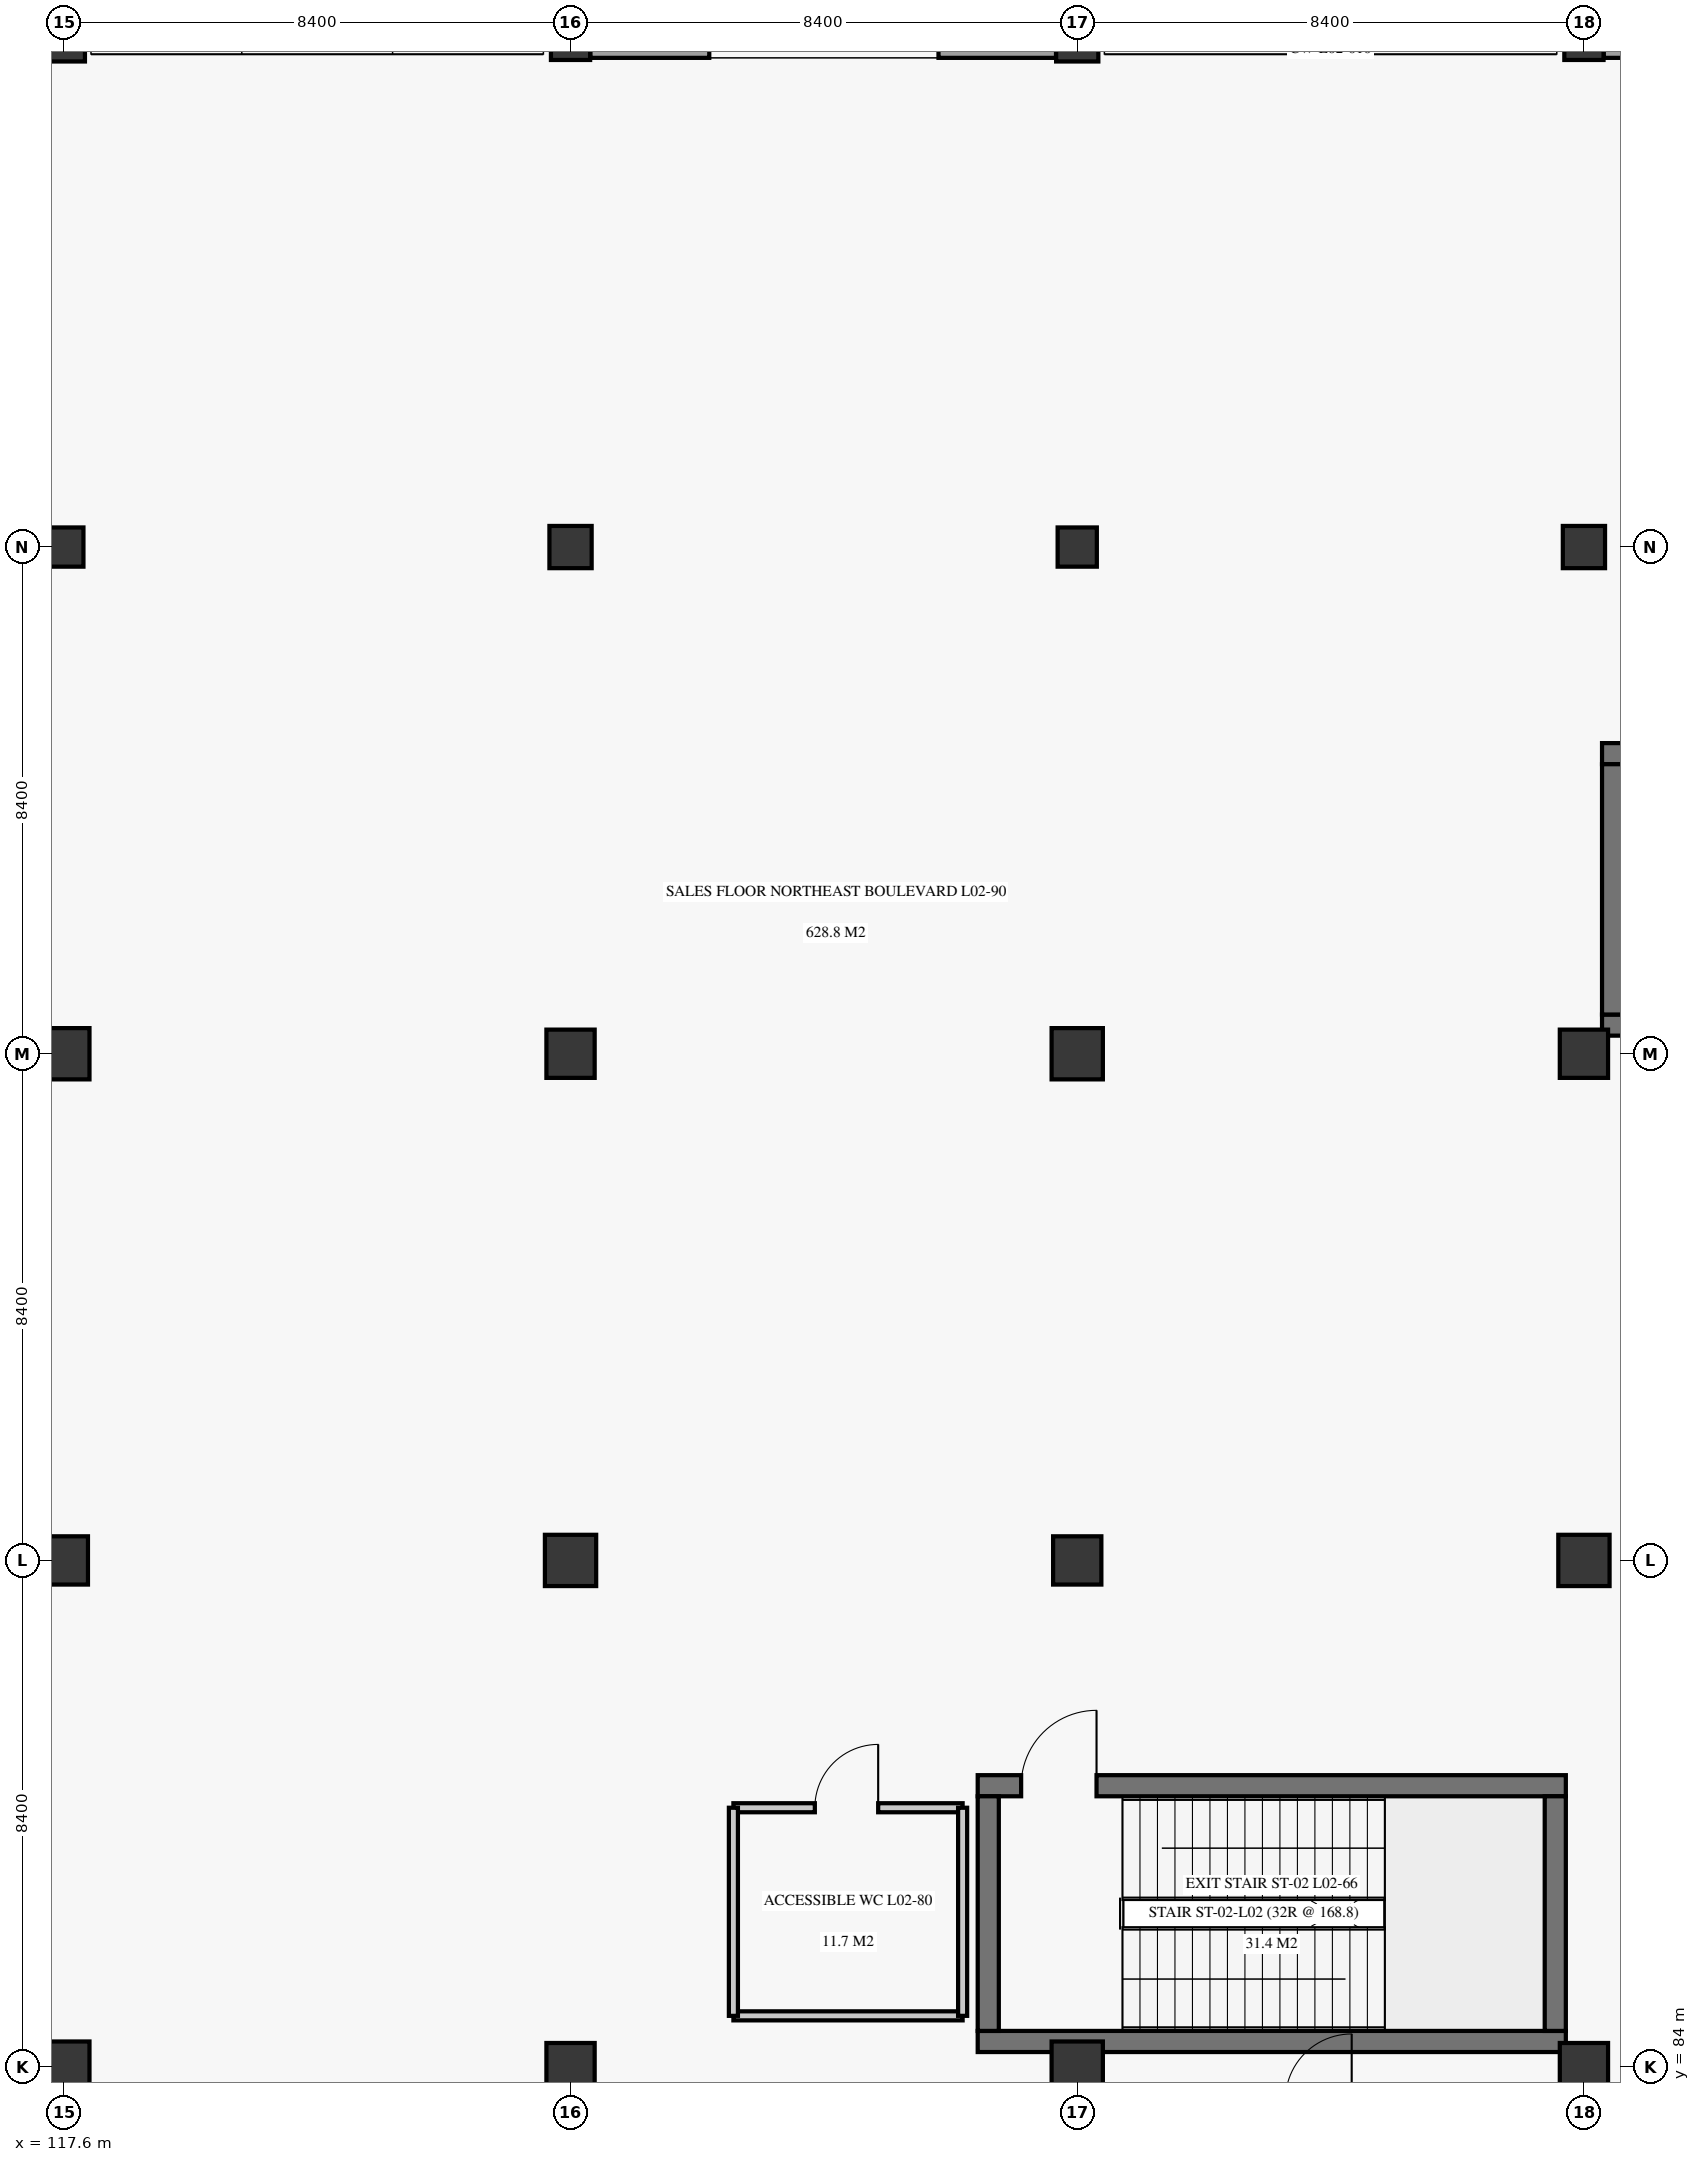
"""IFC4 building model, lengths in metres.
Left out: names, types, materials, properties, quantities, classifications, styles, units other than length and angle.
Written with IfcOpenShell. Run it as: python <this file> out.ifc"""

import sys

from ifc_helpers import new_model, si_unit, direction, frame, frame_2d, origin, origin_2d, place, context, subcontext, project, spatial, rectangle, extrude, element, fill, save


model = new_model("IFC4")
c1 = context("Model", 3, precision=1e-05, world=origin(), true_north=direction((0.0, 1.0)))
c2 = subcontext(c1, "Body", "Model", "MODEL_VIEW")
j1 = project(units=[si_unit("LENGTHUNIT", "METRE"), si_unit("PLANEANGLEUNIT", "RADIAN")], contexts=[c1])
p1 = place(None, origin())
s1 = spatial("IfcSite", under=j1, at=p1, CompositionType="ELEMENT")
p2 = place(p1, origin())
s2 = spatial("IfcBuilding", under=s1, at=p2, CompositionType="ELEMENT")
p3 = place(p2, frame((0.0, 0.0, 6.0)))
s3 = spatial("IfcBuildingStorey", under=s2, at=p3, CompositionType="ELEMENT", Elevation=6.0)
p4 = place(p3, frame((117.6, 84.0, 0.0), z_axis=(0.0, 0.0, 1.0), x_axis=(1.0, 0.0, 0.0)))
e1 = element("IfcColumn", 1, at=p4, inside=s3, PredefinedType="COLUMN", context=c2, shape_type="SweptSolid", body=[
    extrude(rectangle(XDim=0.85, YDim=0.85, at=origin_2d()), origin(), (0.0, 0.0, 1.0), 5.1),
])
p5 = place(p3, frame((117.6, 92.4, 0.0), z_axis=(0.0, 0.0, 1.0), x_axis=(1.0, 0.0, 0.0)))
e2 = element("IfcColumn", 2, at=p5, inside=s3, PredefinedType="COLUMN", context=c2, shape_type="SweptSolid", body=[
    extrude(rectangle(XDim=0.8, YDim=0.8, at=origin_2d()), origin(), (0.0, 0.0, 1.0), 5.1),
])
p6 = place(p3, frame((117.6, 100.8, 0.0), z_axis=(0.0, 0.0, 1.0), x_axis=(1.0, 0.0, 0.0)))
e3 = element("IfcColumn", 3, at=p6, inside=s3, PredefinedType="COLUMN", context=c2, shape_type="SweptSolid", body=[
    extrude(rectangle(XDim=0.85, YDim=0.85, at=origin_2d()), origin(), (0.0, 0.0, 1.0), 5.1),
])
p7 = place(p3, frame((117.6, 109.2, 0.0), z_axis=(0.0, 0.0, 1.0), x_axis=(1.0, 0.0, 0.0)))
e4 = element("IfcColumn", 4, at=p7, inside=s3, PredefinedType="COLUMN", context=c2, shape_type="SweptSolid", body=[
    extrude(rectangle(XDim=0.65, YDim=0.65, at=origin_2d()), origin(), (0.0, 0.0, 1.0), 5.1),
])
p8 = place(p3, frame((117.6, 117.6, 0.0), z_axis=(0.0, 0.0, 1.0), x_axis=(1.0, 0.0, 0.0)))
e5 = element("IfcColumn", 5, at=p8, inside=s3, PredefinedType="COLUMN", context=c2, shape_type="SweptSolid", body=[
    extrude(rectangle(XDim=0.7, YDim=0.7, at=origin_2d()), origin(), (0.0, 0.0, 1.0), 5.1),
])
p9 = place(p3, frame((126.0, 84.0, 0.0), z_axis=(0.0, 0.0, 1.0), x_axis=(1.0, 0.0, 0.0)))
e6 = element("IfcColumn", 6, at=p9, inside=s3, PredefinedType="COLUMN", context=c2, shape_type="SweptSolid", body=[
    extrude(rectangle(XDim=0.8, YDim=0.8, at=origin_2d()), origin(), (0.0, 0.0, 1.0), 5.1),
])
p10 = place(p3, frame((126.0, 92.4, 0.0), z_axis=(0.0, 0.0, 1.0), x_axis=(1.0, 0.0, 0.0)))
e7 = element("IfcColumn", 7, at=p10, inside=s3, PredefinedType="COLUMN", context=c2, shape_type="SweptSolid", body=[
    extrude(rectangle(XDim=0.85, YDim=0.85, at=origin_2d()), origin(), (0.0, 0.0, 1.0), 5.1),
])
p11 = place(p3, frame((126.0, 100.8, 0.0), z_axis=(0.0, 0.0, 1.0), x_axis=(1.0, 0.0, 0.0)))
e8 = element("IfcColumn", 8, at=p11, inside=s3, PredefinedType="COLUMN", context=c2, shape_type="SweptSolid", body=[
    extrude(rectangle(XDim=0.8, YDim=0.8, at=origin_2d()), origin(), (0.0, 0.0, 1.0), 5.1),
])
p12 = place(p3, frame((126.0, 109.2, 0.0), z_axis=(0.0, 0.0, 1.0), x_axis=(1.0, 0.0, 0.0)))
e9 = element("IfcColumn", 9, at=p12, inside=s3, PredefinedType="COLUMN", context=c2, shape_type="SweptSolid", body=[
    extrude(rectangle(XDim=0.7, YDim=0.7, at=origin_2d()), origin(), (0.0, 0.0, 1.0), 5.1),
])
p13 = place(p3, frame((126.0, 117.6, 0.0), z_axis=(0.0, 0.0, 1.0), x_axis=(1.0, 0.0, 0.0)))
e10 = element("IfcColumn", 10, at=p13, inside=s3, PredefinedType="COLUMN", context=c2, shape_type="SweptSolid", body=[
    extrude(rectangle(XDim=0.65, YDim=0.65, at=origin_2d()), origin(), (0.0, 0.0, 1.0), 5.1),
])
p14 = place(p3, frame((134.4, 84.0, 0.0), z_axis=(0.0, 0.0, 1.0), x_axis=(1.0, 0.0, 0.0)))
e11 = element("IfcColumn", 11, at=p14, inside=s3, PredefinedType="COLUMN", context=c2, shape_type="SweptSolid", body=[
    extrude(rectangle(XDim=0.85, YDim=0.85, at=origin_2d()), origin(), (0.0, 0.0, 1.0), 5.1),
])
p15 = place(p3, frame((134.4, 92.4, 0.0), z_axis=(0.0, 0.0, 1.0), x_axis=(1.0, 0.0, 0.0)))
e12 = element("IfcColumn", 12, at=p15, inside=s3, PredefinedType="COLUMN", context=c2, shape_type="SweptSolid", body=[
    extrude(rectangle(XDim=0.8, YDim=0.8, at=origin_2d()), origin(), (0.0, 0.0, 1.0), 5.1),
])
p16 = place(p3, frame((134.4, 100.8, 0.0), z_axis=(0.0, 0.0, 1.0), x_axis=(1.0, 0.0, 0.0)))
e13 = element("IfcColumn", 13, at=p16, inside=s3, PredefinedType="COLUMN", context=c2, shape_type="SweptSolid", body=[
    extrude(rectangle(XDim=0.85, YDim=0.85, at=origin_2d()), origin(), (0.0, 0.0, 1.0), 5.1),
])
p17 = place(p3, frame((134.4, 109.2, 0.0), z_axis=(0.0, 0.0, 1.0), x_axis=(1.0, 0.0, 0.0)))
e14 = element("IfcColumn", 14, at=p17, inside=s3, PredefinedType="COLUMN", context=c2, shape_type="SweptSolid", body=[
    extrude(rectangle(XDim=0.65, YDim=0.65, at=origin_2d()), origin(), (0.0, 0.0, 1.0), 5.1),
])
p18 = place(p3, frame((134.4, 117.6, 0.0), z_axis=(0.0, 0.0, 1.0), x_axis=(1.0, 0.0, 0.0)))
e15 = element("IfcColumn", 15, at=p18, inside=s3, PredefinedType="COLUMN", context=c2, shape_type="SweptSolid", body=[
    extrude(rectangle(XDim=0.7, YDim=0.7, at=origin_2d()), origin(), (0.0, 0.0, 1.0), 5.1),
])
p19 = place(p3, frame((142.8, 84.0, 0.0), z_axis=(0.0, 0.0, 1.0), x_axis=(1.0, 0.0, 0.0)))
e16 = element("IfcColumn", 16, at=p19, inside=s3, PredefinedType="COLUMN", context=c2, shape_type="SweptSolid", body=[
    extrude(rectangle(XDim=0.8, YDim=0.8, at=origin_2d()), origin(), (0.0, 0.0, 1.0), 5.1),
])
p20 = place(p3, frame((142.8, 92.4, 0.0), z_axis=(0.0, 0.0, 1.0), x_axis=(1.0, 0.0, 0.0)))
e17 = element("IfcColumn", 17, at=p20, inside=s3, PredefinedType="COLUMN", context=c2, shape_type="SweptSolid", body=[
    extrude(rectangle(XDim=0.85, YDim=0.85, at=origin_2d()), origin(), (0.0, 0.0, 1.0), 5.1),
])
p21 = place(p3, frame((142.8, 100.8, 0.0), z_axis=(0.0, 0.0, 1.0), x_axis=(1.0, 0.0, 0.0)))
e18 = element("IfcColumn", 18, at=p21, inside=s3, PredefinedType="COLUMN", context=c2, shape_type="SweptSolid", body=[
    extrude(rectangle(XDim=0.8, YDim=0.8, at=origin_2d()), origin(), (0.0, 0.0, 1.0), 5.1),
])
p22 = place(p3, frame((142.8, 109.2, 0.0), z_axis=(0.0, 0.0, 1.0), x_axis=(1.0, 0.0, 0.0)))
e19 = element("IfcColumn", 19, at=p22, inside=s3, PredefinedType="COLUMN", context=c2, shape_type="SweptSolid", body=[
    extrude(rectangle(XDim=0.7, YDim=0.7, at=origin_2d()), origin(), (0.0, 0.0, 1.0), 5.1),
])
p23 = place(p3, frame((142.8, 117.6, 0.0), z_axis=(0.0, 0.0, 1.0), x_axis=(1.0, 0.0, 0.0)))
e20 = element("IfcColumn", 20, at=p23, inside=s3, PredefinedType="COLUMN", context=c2, shape_type="SweptSolid", body=[
    extrude(rectangle(XDim=0.65, YDim=0.65, at=origin_2d()), origin(), (0.0, 0.0, 1.0), 5.1),
])
p24 = place(p3, frame((126.328, 117.45, 0.0), z_axis=(0.0, 0.0, 1.0), x_axis=(1.0, 0.0, 0.0)))
e21 = element("IfcWall", 21, at=p24, inside=s3, PredefinedType="SOLIDWALL", context=c2, shape_type="SweptSolid", body=[
    extrude(rectangle(XDim=7.72, YDim=0.28, at=frame_2d((3.86, 0.0))), origin(), (0.0, 0.0, 1.0), 4.38),
])
p25 = place(p24, frame((1.972, 0.0, 0.95)))
e22 = element("IfcOpeningElement", 22, at=p25, cuts=e21, PredefinedType="OPENING", context=c2, shape_type="SweptSolid", body=[
    extrude(rectangle(XDim=3.8, YDim=2.2, at=frame_2d((1.9, 1.1))), frame((0.0, 0.15, 0.0), z_axis=(0.0, -1.0, 0.0), x_axis=(1.0, 0.0, 0.0)), (0.0, 0.0, 1.0), 0.3),
])
p26 = place(p3, frame((143.128, 117.45, 0.0), z_axis=(0.0, 0.0, 1.0), x_axis=(1.0, 0.0, 0.0)))
e23 = element("IfcWall", 23, at=p26, inside=s3, PredefinedType="SOLIDWALL", context=c2, shape_type="SweptSolid", body=[
    extrude(rectangle(XDim=7.718, YDim=0.28, at=frame_2d((3.859, 0.0))), origin(), (0.0, 0.0, 1.0), 4.38),
])
p27 = place(p26, frame((2.272, 0.0, 0.95)))
e24 = element("IfcOpeningElement", 24, at=p27, cuts=e23, PredefinedType="OPENING", context=c2, shape_type="SweptSolid", body=[
    extrude(rectangle(XDim=3.2, YDim=2.15, at=frame_2d((1.6, 1.075))), frame((0.0, 0.15, 0.0), z_axis=(0.0, -1.0, 0.0), x_axis=(1.0, 0.0, 0.0)), (0.0, 0.0, 1.0), 0.3),
])
p28 = place(p3, frame((132.75, 84.425, 0.0), z_axis=(0.0, 0.0, 1.0), x_axis=(1.0, 0.0, 0.0)))
e25 = element("IfcWall", 25, at=p28, inside=s3, PredefinedType="SHEAR", context=c2, shape_type="SweptSolid", body=[
    extrude(rectangle(XDim=9.75, YDim=0.35, at=frame_2d((4.875, 0.0))), origin(), (0.0, 0.0, 1.0), 5.1),
])
p29 = place(p3, frame((132.75, 88.665, 0.0), z_axis=(0.0, 0.0, 1.0), x_axis=(1.0, 0.0, 0.0)))
e26 = element("IfcWall", 26, at=p29, inside=s3, PredefinedType="SHEAR", context=c2, shape_type="SweptSolid", body=[
    extrude(rectangle(XDim=9.75, YDim=0.35, at=frame_2d((4.875, 0.0))), origin(), (0.0, 0.0, 1.0), 5.1),
])
p30 = place(p29, frame((0.72, 0.0, 0.0)))
e27 = element("IfcOpeningElement", 27, at=p30, cuts=e26, PredefinedType="OPENING", context=c2, shape_type="SweptSolid", body=[
    extrude(rectangle(XDim=1.25, YDim=2.2, at=frame_2d((0.625, 1.1))), frame((0.0, 0.185, 0.0), z_axis=(0.0, -1.0, 0.0), x_axis=(1.0, 0.0, 0.0)), (0.0, 0.0, 1.0), 0.37),
])
for number, where, z_axis, x_axis in (
    (28, (132.925, 84.6, 0.0), (0.0, 0.0, 1.0), (0.0, 1.0, 0.0)),
    (29, (142.325, 84.6, 0.0), (0.0, 0.0, 1.0), (0.0, 1.0, 0.0)),
):
    element("IfcWall", number, at=place(p3, frame(where, z_axis=z_axis, x_axis=x_axis)), inside=s3, PredefinedType="SHEAR", context=c2, shape_type="SweptSolid", body=[
        extrude(rectangle(XDim=3.89, YDim=0.35, at=frame_2d((1.945, 0.0))), origin(), (0.0, 0.0, 1.0), 5.1),
    ])
p31 = place(p3, frame((143.1, 101.275, 0.0), z_axis=(0.0, 0.0, 1.0), x_axis=(1.0, 0.0, 0.0)))
e30 = element("IfcWall", 30, at=p31, inside=s3, PredefinedType="SHEAR", context=c2, shape_type="SweptSolid", body=[
    extrude(rectangle(XDim=9.75, YDim=0.35, at=frame_2d((4.875, 0.0))), origin(), (0.0, 0.0, 1.0), 5.1),
])
p32 = place(p31, frame((0.72, 0.0, 0.0)))
e31 = element("IfcOpeningElement", 31, at=p32, cuts=e30, PredefinedType="OPENING", context=c2, shape_type="SweptSolid", body=[
    extrude(rectangle(XDim=1.35, YDim=2.25, at=frame_2d((0.675, 1.125))), frame((0.0, 0.185, 0.0), z_axis=(0.0, -1.0, 0.0), x_axis=(1.0, 0.0, 0.0)), (0.0, 0.0, 1.0), 0.37),
])
p33 = place(p3, frame((143.1, 105.775, 0.0), z_axis=(0.0, 0.0, 1.0), x_axis=(1.0, 0.0, 0.0)))
e32 = element("IfcWall", 32, at=p33, inside=s3, PredefinedType="SHEAR", context=c2, shape_type="SweptSolid", body=[
    extrude(rectangle(XDim=9.75, YDim=0.35, at=frame_2d((4.875, 0.0))), origin(), (0.0, 0.0, 1.0), 5.1),
])
p34 = place(p3, frame((143.275, 101.45, 0.0), z_axis=(0.0, 0.0, 1.0), x_axis=(0.0, 1.0, 0.0)))
e33 = element("IfcWall", 33, at=p34, inside=s3, PredefinedType="SHEAR", context=c2, shape_type="SweptSolid", body=[
    extrude(rectangle(XDim=4.15, YDim=0.35, at=frame_2d((2.075, 0.0))), origin(), (0.0, 0.0, 1.0), 5.1),
])
p35 = place(p3, frame((128.7, 88.3, 0.0), z_axis=(0.0, 0.0, 1.0), x_axis=(1.0, 0.0, 0.0)))
e34 = element("IfcWall", 34, at=p35, inside=s3, PredefinedType="PARTITIONING", context=c2, shape_type="SweptSolid", body=[
    extrude(rectangle(XDim=3.8, YDim=0.15, at=frame_2d((1.9, 0.0))), origin(), (0.0, 0.0, 1.0), 4.72),
])
p36 = place(p35, frame((1.35, 0.0, 0.0)))
e35 = element("IfcOpeningElement", 35, at=p36, cuts=e34, PredefinedType="OPENING", context=c2, shape_type="SweptSolid", body=[
    extrude(rectangle(XDim=1.05, YDim=2.15, at=frame_2d((0.525, 1.075))), frame((0.0, 0.085, 0.0), z_axis=(0.0, -1.0, 0.0), x_axis=(1.0, 0.0, 0.0)), (0.0, 0.0, 1.0), 0.17),
])
p37 = place(p3, frame((128.7, 84.85, 0.0), z_axis=(0.0, 0.0, 1.0), x_axis=(1.0, 0.0, 0.0)))
e36 = element("IfcWall", 36, at=p37, inside=s3, PredefinedType="PARTITIONING", context=c2, shape_type="SweptSolid", body=[
    extrude(rectangle(XDim=3.8, YDim=0.15, at=frame_2d((1.9, 0.0))), origin(), (0.0, 0.0, 1.0), 4.72),
])
for number, where, z_axis, x_axis in (
    (37, (128.7, 84.85, 0.0), (0.0, 0.0, 1.0), (0.0, 1.0, 0.0)),
    (38, (132.5, 84.85, 0.0), (0.0, 0.0, 1.0), (0.0, 1.0, 0.0)),
):
    element("IfcWall", number, at=place(p3, frame(where, z_axis=z_axis, x_axis=x_axis)), inside=s3, PredefinedType="PARTITIONING", context=c2, shape_type="SweptSolid", body=[
        extrude(rectangle(XDim=3.45, YDim=0.15, at=frame_2d((1.725, 0.0))), origin(), (0.0, 0.0, 1.0), 4.72),
    ])
p38 = place(p30, origin())
e39 = element("IfcDoor", 39, at=p38, inside=s3, OperationType="SINGLE_SWING_RIGHT", PredefinedType="DOOR", context=c2, shape_type="SweptSolid", body=[
    extrude(rectangle(XDim=1.25, YDim=2.2, at=frame_2d((0.625, 1.1))), frame((0.0, 0.025, 0.0), z_axis=(0.0, -1.0, 0.0), x_axis=(1.0, 0.0, 0.0)), (0.0, 0.0, 1.0), 0.05),
])
fill(e27, e39)
p39 = place(p36, origin())
e40 = element("IfcDoor", 40, at=p39, inside=s3, OperationType="SINGLE_SWING_RIGHT", PredefinedType="DOOR", context=c2, shape_type="SweptSolid", body=[
    extrude(rectangle(XDim=1.05, YDim=2.15, at=frame_2d((0.525, 1.075))), frame((0.0, 0.025, 0.0), z_axis=(0.0, -1.0, 0.0), x_axis=(1.0, 0.0, 0.0)), (0.0, 0.0, 1.0), 0.05),
])
fill(e35, e40)
save(model, sys.argv[1])
